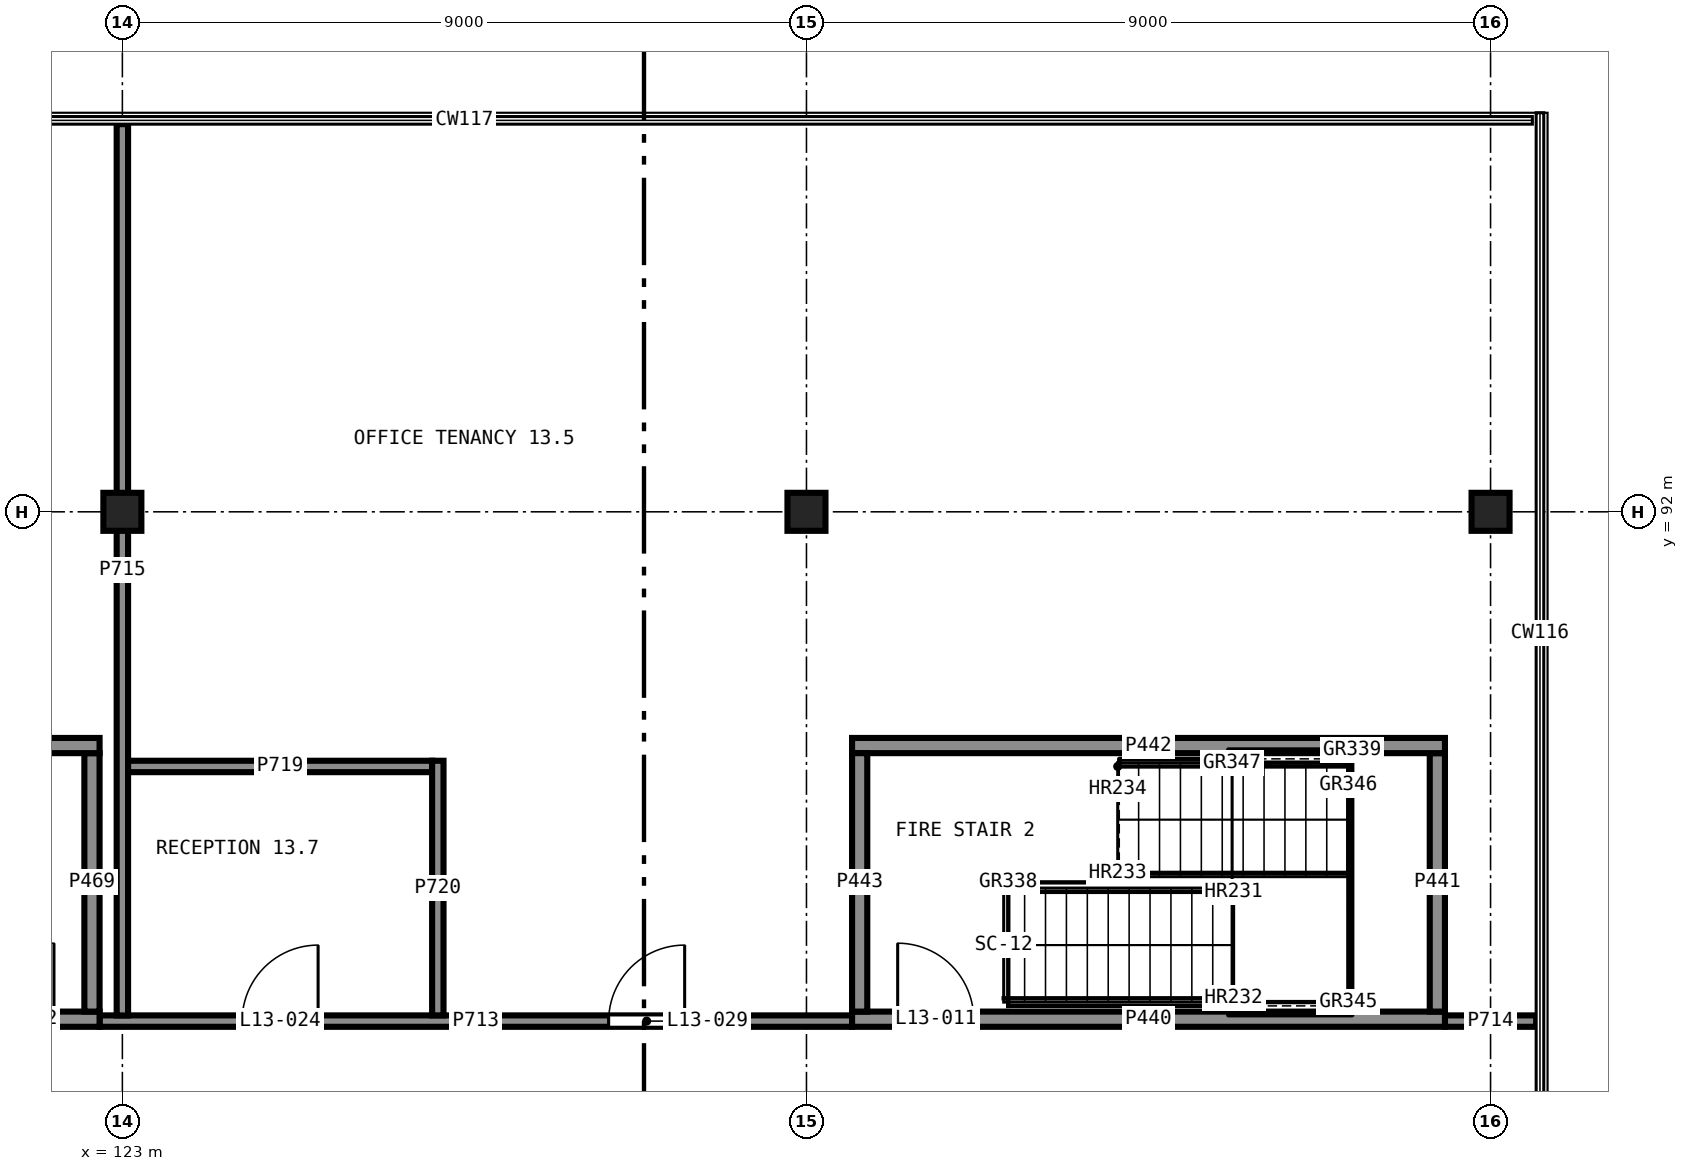
"""IFC4 building model, lengths in metres.
Left out: names, types, materials, properties, quantities, classifications, styles, units other than length and angle.
Written with IfcOpenShell. Run it as: python <this file> out.ifc"""

import sys

from ifc_helpers import new_model, si_unit, direction, frame, frame_2d, origin, origin_2d, place, context, subcontext, project, spatial, rectangle, extrude, element, fill, save


model = new_model("IFC4")
c1 = context("Model", 3, precision=1e-05, world=origin(), true_north=direction((0.0, 1.0)))
c2 = subcontext(c1, "Body", "Model", "MODEL_VIEW")
j1 = project(units=[si_unit("LENGTHUNIT", "METRE"), si_unit("PLANEANGLEUNIT", "RADIAN")], contexts=[c1])
p1 = place(None, origin())
s1 = spatial("IfcSite", under=j1, at=p1, CompositionType="ELEMENT")
p2 = place(p1, origin())
s2 = spatial("IfcBuilding", under=s1, at=p2, CompositionType="ELEMENT")
p3 = place(p2, frame((0.0, 0.0, 53.5)))
s3 = spatial("IfcBuildingStorey", under=s2, at=p3, CompositionType="ELEMENT", Elevation=53.5)
for number, where, z_axis, x_axis in (
    (1, (123.0, 92.0, 0.0), (0.0, 0.0, 1.0), (1.0, 0.0, 0.0)),
    (2, (132.0, 92.0, 0.0), (0.0, 0.0, 1.0), (1.0, 0.0, 0.0)),
    (3, (141.0, 92.0, 0.0), (0.0, 0.0, 1.0), (1.0, 0.0, 0.0)),
):
    element("IfcColumn", number, at=place(p3, frame(where, z_axis=z_axis, x_axis=x_axis)), inside=s3, PredefinedType="COLUMN", context=c2, shape_type="SweptSolid", body=[
        extrude(rectangle(XDim=0.5, YDim=0.5, at=origin_2d()), origin(), (0.0, 0.0, 1.0), 4.0),
    ])
p4 = place(p3, frame((132.6, 85.325, 0.0), z_axis=(0.0, 0.0, 1.0), x_axis=(1.0, 0.0, 0.0)))
e4 = element("IfcWall", 4, at=p4, inside=s3, PredefinedType="SHEAR", context=c2, shape_type="SweptSolid", body=[
    extrude(rectangle(XDim=7.8, YDim=0.2, at=frame_2d((3.9, 0.0))), origin(), (0.0, 0.0, 1.0), 3.75),
])
p5 = place(p4, frame((0.6, 0.0, 0.0)))
e5 = element("IfcOpeningElement", 5, at=p5, cuts=e4, PredefinedType="OPENING", context=c2, shape_type="SweptSolid", body=[
    extrude(rectangle(XDim=1.0, YDim=2.1, at=frame_2d((0.5, 1.05))), frame((0.0, 0.11, 0.0), z_axis=(0.0, -1.0, 0.0), x_axis=(1.0, 0.0, 0.0)), (0.0, 0.0, 1.0), 0.22),
])
p6 = place(p3, frame((140.3, 85.425, 0.0), z_axis=(0.0, 0.0, 1.0), x_axis=(0.0, 1.0, 0.0)))
e6 = element("IfcWall", 6, at=p6, inside=s3, PredefinedType="SHEAR", context=c2, shape_type="SweptSolid", body=[
    extrude(rectangle(XDim=3.4, YDim=0.2, at=frame_2d((1.7, 0.0))), origin(), (0.0, 0.0, 1.0), 3.75),
])
p7 = place(p3, frame((140.4, 88.925, 0.0), z_axis=(0.0, 0.0, 1.0), x_axis=(-1.0, 0.0, 0.0)))
e7 = element("IfcWall", 7, at=p7, inside=s3, PredefinedType="SHEAR", context=c2, shape_type="SweptSolid", body=[
    extrude(rectangle(XDim=7.8, YDim=0.2, at=frame_2d((3.9, 0.0))), origin(), (0.0, 0.0, 1.0), 3.75),
])
p8 = place(p3, frame((132.7, 88.825, 0.0), z_axis=(0.0, 0.0, 1.0), x_axis=(0.0, -1.0, 0.0)))
e8 = element("IfcWall", 8, at=p8, inside=s3, PredefinedType="SHEAR", context=c2, shape_type="SweptSolid", body=[
    extrude(rectangle(XDim=3.4, YDim=0.2, at=frame_2d((1.7, 0.0))), origin(), (0.0, 0.0, 1.0), 3.75),
])
p9 = place(p3, frame((114.9, 85.325, 0.0), z_axis=(0.0, 0.0, 1.0), x_axis=(1.0, 0.0, 0.0)))
e9 = element("IfcWall", 9, at=p9, inside=s3, PredefinedType="SHEAR", context=c2, shape_type="SweptSolid", body=[
    extrude(rectangle(XDim=7.8, YDim=0.2, at=frame_2d((3.9, 0.0))), origin(), (0.0, 0.0, 1.0), 3.75),
])
p10 = place(p9, frame((6.2, 0.0, 0.0)))
e10 = element("IfcOpeningElement", 10, at=p10, cuts=e9, PredefinedType="OPENING", context=c2, shape_type="SweptSolid", body=[
    extrude(rectangle(XDim=1.0, YDim=2.1, at=frame_2d((0.5, 1.05))), frame((0.0, 0.11, 0.0), z_axis=(0.0, -1.0, 0.0), x_axis=(1.0, 0.0, 0.0)), (0.0, 0.0, 1.0), 0.22),
])
p11 = place(p3, frame((122.6, 85.425, 0.0), z_axis=(0.0, 0.0, 1.0), x_axis=(0.0, 1.0, 0.0)))
e11 = element("IfcWall", 11, at=p11, inside=s3, PredefinedType="SHEAR", context=c2, shape_type="SweptSolid", body=[
    extrude(rectangle(XDim=3.4, YDim=0.2, at=frame_2d((1.7, 0.0))), origin(), (0.0, 0.0, 1.0), 3.75),
])
p12 = place(p3, frame((122.7, 88.925, 0.0), z_axis=(0.0, 0.0, 1.0), x_axis=(-1.0, 0.0, 0.0)))
e12 = element("IfcWall", 12, at=p12, inside=s3, PredefinedType="SHEAR", context=c2, shape_type="SweptSolid", body=[
    extrude(rectangle(XDim=7.8, YDim=0.2, at=frame_2d((3.9, 0.0))), origin(), (0.0, 0.0, 1.0), 3.75),
])
p13 = place(p3, frame((122.7, 85.3, 0.0), z_axis=(0.0, 0.0, 1.0), x_axis=(1.0, 0.0, 0.0)))
e13 = element("IfcWall", 13, at=p13, inside=s3, PredefinedType="PARTITIONING", context=c2, shape_type="SweptSolid", body=[
    extrude(rectangle(XDim=9.9, YDim=0.15, at=frame_2d((4.95, 0.0))), origin(), (0.0, 0.0, 1.0), 3.75),
])
p14 = place(p13, frame((1.875, 0.0, 0.0)))
e14 = element("IfcOpeningElement", 14, at=p14, cuts=e13, PredefinedType="OPENING", context=c2, shape_type="SweptSolid", body=[
    extrude(rectangle(XDim=1.0, YDim=2.1, at=frame_2d((0.5, 1.05))), frame((0.0, 0.085, 0.0), z_axis=(0.0, -1.0, 0.0), x_axis=(1.0, 0.0, 0.0)), (0.0, 0.0, 1.0), 0.17),
])
p15 = place(p13, frame((6.698, 0.0, 0.0)))
e15 = element("IfcOpeningElement", 15, at=p15, cuts=e13, PredefinedType="OPENING", context=c2, shape_type="SweptSolid", body=[
    extrude(rectangle(XDim=1.0, YDim=2.1, at=frame_2d((0.5, 1.05))), frame((0.0, 0.085, 0.0), z_axis=(0.0, -1.0, 0.0), x_axis=(1.0, 0.0, 0.0)), (0.0, 0.0, 1.0), 0.17),
])
p16 = place(p3, frame((140.4, 85.3, 0.0), z_axis=(0.0, 0.0, 1.0), x_axis=(1.0, 0.0, 0.0)))
e16 = element("IfcWall", 16, at=p16, inside=s3, PredefinedType="PARTITIONING", context=c2, shape_type="SweptSolid", body=[
    extrude(rectangle(XDim=1.2, YDim=0.15, at=frame_2d((0.6, 0.0))), origin(), (0.0, 0.0, 1.0), 3.75),
])
p17 = place(p3, frame((123.0, 85.374, 0.0), z_axis=(0.0, 0.0, 1.0), x_axis=(0.0, 1.0, 0.0)))
e17 = element("IfcWall", 17, at=p17, inside=s3, PredefinedType="PARTITIONING", context=c2, shape_type="SweptSolid", body=[
    extrude(rectangle(XDim=11.726, YDim=0.15, at=frame_2d((5.863, 0.0))), origin(), (0.0, 0.0, 1.0), 2.85),
])
p18 = place(p3, frame((123.075, 88.65, 0.0), z_axis=(0.0, 0.0, 1.0), x_axis=(1.0, 0.0, 0.0)))
e18 = element("IfcWall", 18, at=p18, inside=s3, PredefinedType="PARTITIONING", context=c2, shape_type="SweptSolid", body=[
    extrude(rectangle(XDim=4.0, YDim=0.15, at=frame_2d((2.0, 0.0))), origin(), (0.0, 0.0, 1.0), 3.75),
])
p19 = place(p3, frame((127.15, 85.375, 0.0), z_axis=(0.0, 0.0, 1.0), x_axis=(0.0, 1.0, 0.0)))
e19 = element("IfcWall", 19, at=p19, inside=s3, PredefinedType="PARTITIONING", context=c2, shape_type="SweptSolid", body=[
    extrude(rectangle(XDim=3.35, YDim=0.15, at=frame_2d((1.675, 0.0))), origin(), (0.0, 0.0, 1.0), 3.75),
])
p20 = place(p5, origin())
e20 = element("IfcDoor", 20, at=p20, inside=s3, OperationType="SINGLE_SWING_RIGHT", PredefinedType="DOOR", context=c2, shape_type="SweptSolid", body=[
    extrude(rectangle(XDim=1.0, YDim=2.1, at=frame_2d((0.5, 1.05))), frame((0.0, 0.025, 0.0), z_axis=(0.0, -1.0, 0.0), x_axis=(1.0, 0.0, 0.0)), (0.0, 0.0, 1.0), 0.05),
])
fill(e5, e20)
p21 = place(p10, origin())
e21 = element("IfcDoor", 21, at=p21, inside=s3, OperationType="SINGLE_SWING_LEFT", PredefinedType="DOOR", context=c2, shape_type="SweptSolid", body=[
    extrude(rectangle(XDim=1.0, YDim=2.1, at=frame_2d((0.5, 1.05))), frame((0.0, 0.025, 0.0), z_axis=(0.0, -1.0, 0.0), x_axis=(1.0, 0.0, 0.0)), (0.0, 0.0, 1.0), 0.05),
])
fill(e10, e21)
p22 = place(p14, origin())
e22 = element("IfcDoor", 22, at=p22, inside=s3, OperationType="SINGLE_SWING_LEFT", PredefinedType="DOOR", context=c2, shape_type="SweptSolid", body=[
    extrude(rectangle(XDim=1.0, YDim=2.1, at=frame_2d((0.5, 1.05))), frame((0.0, 0.025, 0.0), z_axis=(0.0, -1.0, 0.0), x_axis=(1.0, 0.0, 0.0)), (0.0, 0.0, 1.0), 0.05),
])
fill(e14, e22)
p23 = place(p15, origin())
e23 = element("IfcDoor", 23, at=p23, inside=s3, OperationType="SINGLE_SWING_LEFT", PredefinedType="DOOR", context=c2, shape_type="SweptSolid", body=[
    extrude(rectangle(XDim=1.0, YDim=2.1, at=frame_2d((0.5, 1.05))), frame((0.0, 0.025, 0.0), z_axis=(0.0, -1.0, 0.0), x_axis=(1.0, 0.0, 0.0)), (0.0, 0.0, 1.0), 0.05),
])
fill(e15, e23)
save(model, sys.argv[1])
